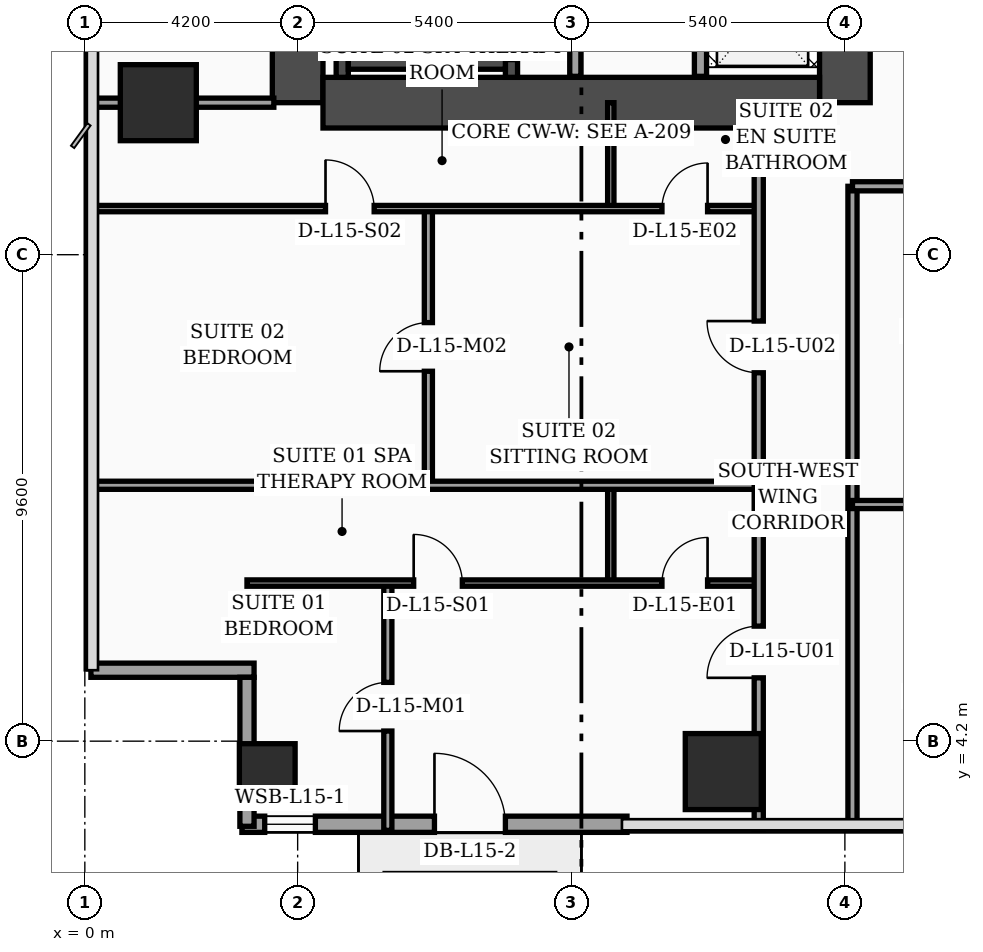
"""IFC4 building model, lengths in metres.
Left out: names, types, materials, properties, quantities, classifications, styles, units other than length and angle.
Written with IfcOpenShell. Run it as: python <this file> out.ifc"""

import sys

from ifc_helpers import new_model, si_unit, direction, frame, frame_2d, origin, origin_2d, place, context, subcontext, project, spatial, rectangle, hollow_rectangle, extrude, element, fill, save


model = new_model("IFC4")
c1 = context("Model", 3, precision=1e-05, world=origin(), true_north=direction((0.0, 1.0)))
c2 = subcontext(c1, "Body", "Model", "MODEL_VIEW")
j1 = project(units=[si_unit("LENGTHUNIT", "METRE"), si_unit("PLANEANGLEUNIT", "RADIAN")], contexts=[c1])
p1 = place(None, origin())
s1 = spatial("IfcSite", under=j1, at=p1, CompositionType="ELEMENT")
p2 = place(p1, origin())
s2 = spatial("IfcBuilding", under=s1, at=p2, CompositionType="ELEMENT")
p3 = place(p2, frame((0.0, 0.0, 66.0)))
s3 = spatial("IfcBuildingStorey", under=s2, at=p3, CompositionType="ELEMENT", Elevation=66.0)
p4 = place(p3, frame((4.2, 16.8, 0.0), z_axis=(0.0, 0.0, 1.0), x_axis=(0.0, 1.0, 0.0)))
e1 = element("IfcWall", 1, at=p4, inside=s3, PredefinedType="SHEAR", context=c2, shape_type="SweptSolid", body=[
    extrude(rectangle(XDim=21.6, YDim=1.0, at=frame_2d((10.8, 0.0))), origin(), (0.0, 0.0, 1.0), 3.56),
])
p5 = place(p3, frame((15.0, 16.8, 0.0), z_axis=(0.0, 0.0, 1.0), x_axis=(0.0, 1.0, 0.0)))
e2 = element("IfcWall", 2, at=p5, inside=s3, PredefinedType="SHEAR", context=c2, shape_type="SweptSolid", body=[
    extrude(rectangle(XDim=21.6, YDim=1.0, at=frame_2d((10.8, 0.0))), origin(), (0.0, 0.0, 1.0), 3.56),
])
p6 = place(p5, frame((8.65, 0.0, 0.0)))
e3 = element("IfcOpeningElement", 3, at=p6, cuts=e2, PredefinedType="OPENING", context=c2, shape_type="SweptSolid", body=[
    extrude(rectangle(XDim=1.1, YDim=2.2, at=frame_2d((0.55, 1.1))), frame((0.0, 0.51, 0.0), z_axis=(0.0, -1.0, 0.0), x_axis=(1.0, 0.0, 0.0)), (0.0, 0.0, 1.0), 1.02),
])
p7 = place(p5, frame((1.25, 0.0, 0.0)))
e4 = element("IfcOpeningElement", 4, at=p7, cuts=e2, PredefinedType="OPENING", context=c2, shape_type="SweptSolid", body=[
    extrude(rectangle(XDim=1.1, YDim=2.2, at=frame_2d((0.55, 1.1))), frame((0.0, 0.51, 0.0), z_axis=(0.0, -1.0, 0.0), x_axis=(1.0, 0.0, 0.0)), (0.0, 0.0, 1.0), 1.02),
])
p8 = place(p5, frame((3.8, 0.0, 0.0)))
e5 = element("IfcOpeningElement", 5, at=p8, cuts=e2, PredefinedType="OPENING", context=c2, shape_type="SweptSolid", body=[
    extrude(rectangle(XDim=1.1, YDim=2.2, at=frame_2d((0.55, 1.1))), frame((0.0, 0.51, 0.0), z_axis=(0.0, -1.0, 0.0), x_axis=(1.0, 0.0, 0.0)), (0.0, 0.0, 1.0), 1.02),
])
p9 = place(p5, frame((6.35, 0.0, 0.0)))
e6 = element("IfcOpeningElement", 6, at=p9, cuts=e2, PredefinedType="OPENING", context=c2, shape_type="SweptSolid", body=[
    extrude(rectangle(XDim=1.1, YDim=2.2, at=frame_2d((0.55, 1.1))), frame((0.0, 0.51, 0.0), z_axis=(0.0, -1.0, 0.0), x_axis=(1.0, 0.0, 0.0)), (0.0, 0.0, 1.0), 1.02),
])
p10 = place(p3, frame((4.7, 16.8, 0.0), z_axis=(0.0, 0.0, 1.0), x_axis=(1.0, 0.0, 0.0)))
e7 = element("IfcWall", 7, at=p10, inside=s3, PredefinedType="SHEAR", context=c2, shape_type="SweptSolid", body=[
    extrude(rectangle(XDim=9.8, YDim=1.0, at=frame_2d((4.9, 0.0))), origin(), (0.0, 0.0, 1.0), 3.56),
])
p11 = place(p3, frame((5.08, 17.3, 0.0), z_axis=(0.0, 0.0, 1.0), x_axis=(0.0, 1.0, 0.0)))
e8 = element("IfcWall", 8, at=p11, inside=s3, PredefinedType="SOLIDWALL", context=c2, shape_type="SweptSolid", body=[
    extrude(rectangle(XDim=9.49, YDim=0.24, at=frame_2d((4.745, 0.0))), origin(), (0.0, 0.0, 1.0), 3.56),
])
p12 = place(p3, frame((8.42, 17.3, 0.0), z_axis=(0.0, 0.0, 1.0), x_axis=(0.0, 1.0, 0.0)))
e9 = element("IfcWall", 9, at=p12, inside=s3, PredefinedType="SOLIDWALL", context=c2, shape_type="SweptSolid", body=[
    extrude(rectangle(XDim=9.49, YDim=0.24, at=frame_2d((4.745, 0.0))), origin(), (0.0, 0.0, 1.0), 3.56),
])
p13 = place(p12, frame((0.35, 0.0, 0.0)))
e10 = element("IfcOpeningElement", 10, at=p13, cuts=e9, PredefinedType="OPENING", context=c2, shape_type="SweptSolid", body=[
    extrude(rectangle(XDim=1.15, YDim=2.2, at=frame_2d((0.575, 1.1))), frame((0.0, 0.13, 0.0), z_axis=(0.0, -1.0, 0.0), x_axis=(1.0, 0.0, 0.0)), (0.0, 0.0, 1.0), 0.26),
])
p14 = place(p3, frame((5.2, 17.58, 0.0), z_axis=(0.0, 0.0, 1.0), x_axis=(1.0, 0.0, 0.0)))
e11 = element("IfcWall", 11, at=p14, inside=s3, PredefinedType="SOLIDWALL", context=c2, shape_type="SweptSolid", body=[
    extrude(rectangle(XDim=3.1, YDim=0.24, at=frame_2d((1.55, 0.0))), origin(), (0.0, 0.0, 1.0), 3.56),
])
p15 = place(p3, frame((3.6, 3.6, 0.0), z_axis=(0.0, 0.0, 1.0), x_axis=(1.0, 0.0, 0.0)))
e12 = element("IfcColumn", 12, at=p15, inside=s3, PredefinedType="COLUMN", context=c2, shape_type="SweptSolid", body=[
    extrude(hollow_rectangle(XDim=1.1, YDim=1.1, WallThickness=0.045, at=origin_2d()), origin(), (0.0, 0.0, 1.0), 3.56),
])
for number, where, z_axis, x_axis in (
    (13, (1.45, 16.8, 0.0), (0.0, 0.0, 1.0), (1.0, 0.0, 0.0)),
    (14, (12.6, 3.6, 0.0), (0.0, 0.0, 1.0), (1.0, 0.0, 0.0)),
):
    element("IfcColumn", number, at=place(p3, frame(where, z_axis=z_axis, x_axis=x_axis)), inside=s3, PredefinedType="COLUMN", context=c2, shape_type="SweptSolid", body=[
        extrude(rectangle(XDim=1.5, YDim=1.5, at=origin_2d()), origin(), (0.0, 0.0, 1.0), 3.56),
    ])
p16 = place(p3, frame((3.1, 2.56, 0.0), z_axis=(0.0, 0.0, 1.0), x_axis=(1.0, 0.0, 0.0)))
e15 = element("IfcWall", 15, at=p16, inside=s3, PredefinedType="SOLIDWALL", context=c2, shape_type="SweptSolid", body=[
    extrude(rectangle(XDim=7.6, YDim=0.32, at=frame_2d((3.8, 0.0))), origin(), (0.0, 0.0, 1.0), 3.56),
])
p17 = place(p16, frame((0.45, 0.0, 0.75)))
e16 = element("IfcOpeningElement", 16, at=p17, cuts=e15, PredefinedType="OPENING", context=c2, shape_type="SweptSolid", body=[
    extrude(rectangle(XDim=1.0, YDim=1.6, at=frame_2d((0.5, 0.8))), frame((0.0, 0.17, 0.0), z_axis=(0.0, -1.0, 0.0), x_axis=(1.0, 0.0, 0.0)), (0.0, 0.0, 1.0), 0.34),
])
p18 = place(p16, frame((3.8, 0.0, 0.0)))
e17 = element("IfcOpeningElement", 17, at=p18, cuts=e15, PredefinedType="OPENING", context=c2, shape_type="SweptSolid", body=[
    extrude(rectangle(XDim=1.4, YDim=2.25, at=frame_2d((0.7, 1.125))), frame((0.0, 0.17, 0.0), z_axis=(0.0, -1.0, 0.0), x_axis=(1.0, 0.0, 0.0)), (0.0, 0.0, 1.0), 0.34),
])
p19 = place(p3, frame((0.12, 5.6, 0.0), z_axis=(0.0, 0.0, 1.0), x_axis=(1.0, 0.0, 0.0)))
e18 = element("IfcWall", 18, at=p19, inside=s3, PredefinedType="SOLIDWALL", context=c2, shape_type="SweptSolid", body=[
    extrude(rectangle(XDim=3.22, YDim=0.28, at=frame_2d((1.61, 0.0))), origin(), (0.0, 0.0, 1.0), 2.84),
])
p20 = place(p3, frame((3.2, 5.46, 0.0), z_axis=(0.0, 0.0, 1.0), x_axis=(0.0, -1.0, 0.0)))
e19 = element("IfcWall", 19, at=p20, inside=s3, PredefinedType="SOLIDWALL", context=c2, shape_type="SweptSolid", body=[
    extrude(rectangle(XDim=2.94, YDim=0.28, at=frame_2d((1.47, 0.0))), origin(), (0.0, 0.0, 1.0), 2.84),
])
p21 = place(p3, frame((9.68, 17.32, 0.0), z_axis=(0.0, 0.0, 1.0), x_axis=(0.0, 1.0, 0.0)))
e20 = element("IfcWall", 20, at=p21, inside=s3, PredefinedType="SOLIDWALL", context=c2, shape_type="SweptSolid", body=[
    extrude(rectangle(XDim=7.68, YDim=0.22, at=frame_2d((3.84, 0.0))), origin(), (0.0, 0.0, 1.0), 3.56),
])
p22 = place(p3, frame((12.15, 17.32, 0.0), z_axis=(0.0, 0.0, 1.0), x_axis=(0.0, 1.0, 0.0)))
e21 = element("IfcWall", 21, at=p22, inside=s3, PredefinedType="SOLIDWALL", context=c2, shape_type="SweptSolid", body=[
    extrude(rectangle(XDim=7.65, YDim=0.24, at=frame_2d((3.825, 0.0))), origin(), (0.0, 0.0, 1.0), 3.56),
])
p23 = place(p3, frame((0.08, 16.8, 0.0), z_axis=(0.0, 0.0, 1.0), x_axis=(1.0, 0.0, 0.0)))
e22 = element("IfcWall", 22, at=p23, inside=s3, PredefinedType="PARTITIONING", context=c2, shape_type="SweptSolid", body=[
    extrude(rectangle(XDim=3.65, YDim=0.18, at=frame_2d((1.825, 0.0))), origin(), (0.0, 0.0, 1.0), 2.84),
])
p24 = place(p3, frame((10.38, 7.32, 0.0), z_axis=(0.0, 0.0, 1.0), x_axis=(0.0, 1.0, 0.0)))
e23 = element("IfcWall", 23, at=p24, inside=s3, PredefinedType="PARTITIONING", context=c2, shape_type="SweptSolid", body=[
    extrude(rectangle(XDim=1.93, YDim=0.125, at=frame_2d((0.965, 0.0))), origin(), (0.0, 0.0, 1.0), 3.56),
])
p25 = place(p3, frame((5.98, 2.44, 0.0), z_axis=(0.0, 0.0, 1.0), x_axis=(0.0, 1.0, 0.0)))
e24 = element("IfcWall", 24, at=p25, inside=s3, PredefinedType="PARTITIONING", context=c2, shape_type="SweptSolid", body=[
    extrude(rectangle(XDim=4.88, YDim=0.16, at=frame_2d((2.44, 0.0))), origin(), (0.0, 0.0, 1.0), 3.04),
])
p26 = place(p25, frame((1.96, 0.0, 0.0)))
e25 = element("IfcOpeningElement", 25, at=p26, cuts=e24, PredefinedType="OPENING", context=c2, shape_type="SweptSolid", body=[
    extrude(rectangle(XDim=0.96, YDim=2.2, at=frame_2d((0.48, 1.1))), frame((0.0, 0.09, 0.0), z_axis=(0.0, -1.0, 0.0), x_axis=(1.0, 0.0, 0.0)), (0.0, 0.0, 1.0), 0.18),
])
p27 = place(p3, frame((3.2, 7.32, 0.0), z_axis=(0.0, 0.0, 1.0), x_axis=(1.0, 0.0, 0.0)))
e26 = element("IfcWall", 26, at=p27, inside=s3, PredefinedType="PARTITIONING", context=c2, shape_type="SweptSolid", body=[
    extrude(rectangle(XDim=10.1, YDim=0.125, at=frame_2d((5.05, 0.0))), origin(), (0.0, 0.0, 1.0), 2.84),
])
p28 = place(p27, frame((3.29, 0.0, 0.0)))
e27 = element("IfcOpeningElement", 27, at=p28, cuts=e26, PredefinedType="OPENING", context=c2, shape_type="SweptSolid", body=[
    extrude(rectangle(XDim=0.96, YDim=2.2, at=frame_2d((0.48, 1.1))), frame((0.0, 0.073, 0.0), z_axis=(0.0, -1.0, 0.0), x_axis=(1.0, 0.0, 0.0)), (0.0, 0.0, 1.0), 0.145),
])
p29 = place(p27, frame((8.19, 0.0, 0.0)))
e28 = element("IfcOpeningElement", 28, at=p29, cuts=e26, PredefinedType="OPENING", context=c2, shape_type="SweptSolid", body=[
    extrude(rectangle(XDim=0.9, YDim=2.15, at=frame_2d((0.45, 1.075))), frame((0.0, 0.073, 0.0), z_axis=(0.0, -1.0, 0.0), x_axis=(1.0, 0.0, 0.0)), (0.0, 0.0, 1.0), 0.145),
])
p30 = place(p3, frame((10.38, 14.71, 0.0), z_axis=(0.0, 0.0, 1.0), x_axis=(0.0, 1.0, 0.0)))
e29 = element("IfcWall", 29, at=p30, inside=s3, PredefinedType="PARTITIONING", context=c2, shape_type="SweptSolid", body=[
    extrude(rectangle(XDim=2.09, YDim=0.125, at=frame_2d((1.045, 0.0))), origin(), (0.0, 0.0, 1.0), 3.56),
])
p31 = place(p3, frame((6.78, 9.25, 0.0), z_axis=(0.0, 0.0, 1.0), x_axis=(0.0, 1.0, 0.0)))
e30 = element("IfcWall", 30, at=p31, inside=s3, PredefinedType="PARTITIONING", context=c2, shape_type="SweptSolid", body=[
    extrude(rectangle(XDim=5.46, YDim=0.16, at=frame_2d((2.73, 0.0))), origin(), (0.0, 0.0, 1.0), 3.14),
])
p32 = place(p31, frame((2.25, 0.0, 0.0)))
e31 = element("IfcOpeningElement", 31, at=p32, cuts=e30, PredefinedType="OPENING", context=c2, shape_type="SweptSolid", body=[
    extrude(rectangle(XDim=0.96, YDim=2.2, at=frame_2d((0.48, 1.1))), frame((0.0, 0.09, 0.0), z_axis=(0.0, -1.0, 0.0), x_axis=(1.0, 0.0, 0.0)), (0.0, 0.0, 1.0), 0.18),
])
p33 = place(p3, frame((0.08, 14.71, 0.0), z_axis=(0.0, 0.0, 1.0), x_axis=(1.0, 0.0, 0.0)))
e32 = element("IfcWall", 32, at=p33, inside=s3, PredefinedType="PARTITIONING", context=c2, shape_type="SweptSolid", body=[
    extrude(rectangle(XDim=13.22, YDim=0.125, at=frame_2d((6.61, 0.0))), origin(), (0.0, 0.0, 1.0), 2.84),
])
p34 = place(p33, frame((4.67, 0.0, 0.0)))
e33 = element("IfcOpeningElement", 33, at=p34, cuts=e32, PredefinedType="OPENING", context=c2, shape_type="SweptSolid", body=[
    extrude(rectangle(XDim=0.96, YDim=2.2, at=frame_2d((0.48, 1.1))), frame((0.0, 0.073, 0.0), z_axis=(0.0, -1.0, 0.0), x_axis=(1.0, 0.0, 0.0)), (0.0, 0.0, 1.0), 0.145),
])
p35 = place(p33, frame((11.31, 0.0, 0.0)))
e34 = element("IfcOpeningElement", 34, at=p35, cuts=e32, PredefinedType="OPENING", context=c2, shape_type="SweptSolid", body=[
    extrude(rectangle(XDim=0.9, YDim=2.15, at=frame_2d((0.45, 1.075))), frame((0.0, 0.073, 0.0), z_axis=(0.0, -1.0, 0.0), x_axis=(1.0, 0.0, 0.0)), (0.0, 0.0, 1.0), 0.145),
])
p36 = place(p3, frame((0.08, 9.25, 0.0), z_axis=(0.0, 0.0, 1.0), x_axis=(1.0, 0.0, 0.0)))
e35 = element("IfcWall", 35, at=p36, inside=s3, PredefinedType="PARTITIONING", context=c2, shape_type="SweptSolid", body=[
    extrude(rectangle(XDim=13.22, YDim=0.16, at=frame_2d((6.61, 0.0))), origin(), (0.0, 0.0, 1.0), 2.84),
])
p37 = place(p3, frame((13.3, 2.44, 0.0), z_axis=(0.0, 0.0, 1.0), x_axis=(0.0, 1.0, 0.0)))
e36 = element("IfcWall", 36, at=p37, inside=s3, PredefinedType="PARTITIONING", context=c2, shape_type="SweptSolid", body=[
    extrude(rectangle(XDim=14.36, YDim=0.18, at=frame_2d((7.18, 0.0))), origin(), (0.0, 0.0, 1.0), 3.04),
])
p38 = place(p37, frame((3.01, 0.0, 0.0)))
e37 = element("IfcOpeningElement", 37, at=p38, cuts=e36, PredefinedType="OPENING", context=c2, shape_type="SweptSolid", body=[
    extrude(rectangle(XDim=1.02, YDim=2.2, at=frame_2d((0.51, 1.1))), frame((0.0, 0.1, 0.0), z_axis=(0.0, -1.0, 0.0), x_axis=(1.0, 0.0, 0.0)), (0.0, 0.0, 1.0), 0.2),
])
p39 = place(p37, frame((9.03, 0.0, 0.0)))
e38 = element("IfcOpeningElement", 38, at=p39, cuts=e36, PredefinedType="OPENING", context=c2, shape_type="SweptSolid", body=[
    extrude(rectangle(XDim=1.02, YDim=2.2, at=frame_2d((0.51, 1.1))), frame((0.0, 0.1, 0.0), z_axis=(0.0, -1.0, 0.0), x_axis=(1.0, 0.0, 0.0)), (0.0, 0.0, 1.0), 0.2),
])
p40 = place(p3, frame((15.15, 2.44, 0.0), z_axis=(0.0, 0.0, 1.0), x_axis=(0.0, 1.0, 0.0)))
e39 = element("IfcWall", 39, at=p40, inside=s3, PredefinedType="PARTITIONING", context=c2, shape_type="SweptSolid", body=[
    extrude(rectangle(XDim=12.71, YDim=0.18, at=frame_2d((6.355, 0.0))), origin(), (0.0, 0.0, 1.0), 3.04),
])
p41 = place(p3, frame((15.15, 8.87, 0.0), z_axis=(0.0, 0.0, 1.0), x_axis=(1.0, 0.0, 0.0)))
e40 = element("IfcWall", 40, at=p41, inside=s3, PredefinedType="PARTITIONING", context=c2, shape_type="SweptSolid", body=[
    extrude(rectangle(XDim=4.45, YDim=0.16, at=frame_2d((2.225, 0.0))), origin(), (0.0, 0.0, 1.0), 3.56),
])
p42 = place(p41, frame((1.75, 0.0, 0.0)))
e41 = element("IfcOpeningElement", 41, at=p42, cuts=e40, PredefinedType="OPENING", context=c2, shape_type="SweptSolid", body=[
    extrude(rectangle(XDim=0.96, YDim=2.2, at=frame_2d((0.48, 1.1))), frame((0.0, 0.09, 0.0), z_axis=(0.0, -1.0, 0.0), x_axis=(1.0, 0.0, 0.0)), (0.0, 0.0, 1.0), 0.18),
])
p43 = place(p3, frame((15.15, 15.15, 0.0), z_axis=(0.0, 0.0, 1.0), x_axis=(1.0, 0.0, 0.0)))
e42 = element("IfcWall", 42, at=p43, inside=s3, PredefinedType="PARTITIONING", context=c2, shape_type="SweptSolid", body=[
    extrude(rectangle(XDim=6.45, YDim=0.18, at=frame_2d((3.225, 0.0))), origin(), (0.0, 0.0, 1.0), 2.34),
])
p44 = place(p43, frame((1.74, 0.0, 0.0)))
e43 = element("IfcOpeningElement", 43, at=p44, cuts=e42, PredefinedType="OPENING", context=c2, shape_type="SweptSolid", body=[
    extrude(rectangle(XDim=1.02, YDim=2.2, at=frame_2d((0.51, 1.1))), frame((0.0, 0.1, 0.0), z_axis=(0.0, -1.0, 0.0), x_axis=(1.0, 0.0, 0.0)), (0.0, 0.0, 1.0), 0.2),
])
p45 = place(p17, origin())
e44 = element("IfcWindow", 44, at=p45, inside=s3, PartitioningType="SINGLE_PANEL", PredefinedType="WINDOW", context=c2, shape_type="SweptSolid", body=[
    extrude(rectangle(XDim=1.0, YDim=1.6, at=frame_2d((0.5, 0.8))), frame((0.0, 0.03, 0.0), z_axis=(0.0, -1.0, 0.0), x_axis=(1.0, 0.0, 0.0)), (0.0, 0.0, 1.0), 0.06),
])
fill(e16, e44)
p46 = place(p18, origin())
e45 = element("IfcDoor", 45, at=p46, inside=s3, OperationType="SINGLE_SWING_LEFT", PredefinedType="DOOR", context=c2, shape_type="SweptSolid", body=[
    extrude(rectangle(XDim=1.4, YDim=2.25, at=frame_2d((0.7, 1.125))), frame((0.0, 0.025, 0.0), z_axis=(0.0, -1.0, 0.0), x_axis=(1.0, 0.0, 0.0)), (0.0, 0.0, 1.0), 0.05),
])
fill(e17, e45)
p47 = place(p26, origin())
e46 = element("IfcDoor", 46, at=p47, inside=s3, OperationType="SINGLE_SWING_LEFT", PredefinedType="DOOR", context=c2, shape_type="SweptSolid", body=[
    extrude(rectangle(XDim=0.96, YDim=2.2, at=frame_2d((0.48, 1.1))), frame((0.0, 0.025, 0.0), z_axis=(0.0, -1.0, 0.0), x_axis=(1.0, 0.0, 0.0)), (0.0, 0.0, 1.0), 0.05),
])
fill(e25, e46)
p48 = place(p28, origin())
e47 = element("IfcDoor", 47, at=p48, inside=s3, OperationType="SINGLE_SWING_LEFT", PredefinedType="DOOR", context=c2, shape_type="SweptSolid", body=[
    extrude(rectangle(XDim=0.96, YDim=2.2, at=frame_2d((0.48, 1.1))), frame((0.0, 0.025, 0.0), z_axis=(0.0, -1.0, 0.0), x_axis=(1.0, 0.0, 0.0)), (0.0, 0.0, 1.0), 0.05),
])
fill(e27, e47)
p49 = place(p29, origin())
e48 = element("IfcDoor", 48, at=p49, inside=s3, OperationType="SINGLE_SWING_RIGHT", PredefinedType="DOOR", context=c2, shape_type="SweptSolid", body=[
    extrude(rectangle(XDim=0.9, YDim=2.15, at=frame_2d((0.45, 1.075))), frame((0.0, 0.025, 0.0), z_axis=(0.0, -1.0, 0.0), x_axis=(1.0, 0.0, 0.0)), (0.0, 0.0, 1.0), 0.05),
])
fill(e28, e48)
p50 = place(p32, origin())
e49 = element("IfcDoor", 49, at=p50, inside=s3, OperationType="SINGLE_SWING_LEFT", PredefinedType="DOOR", context=c2, shape_type="SweptSolid", body=[
    extrude(rectangle(XDim=0.96, YDim=2.2, at=frame_2d((0.48, 1.1))), frame((0.0, 0.025, 0.0), z_axis=(0.0, -1.0, 0.0), x_axis=(1.0, 0.0, 0.0)), (0.0, 0.0, 1.0), 0.05),
])
fill(e31, e49)
p51 = place(p34, origin())
e50 = element("IfcDoor", 50, at=p51, inside=s3, OperationType="SINGLE_SWING_LEFT", PredefinedType="DOOR", context=c2, shape_type="SweptSolid", body=[
    extrude(rectangle(XDim=0.96, YDim=2.2, at=frame_2d((0.48, 1.1))), frame((0.0, 0.025, 0.0), z_axis=(0.0, -1.0, 0.0), x_axis=(1.0, 0.0, 0.0)), (0.0, 0.0, 1.0), 0.05),
])
fill(e33, e50)
p52 = place(p35, origin())
e51 = element("IfcDoor", 51, at=p52, inside=s3, OperationType="SINGLE_SWING_RIGHT", PredefinedType="DOOR", context=c2, shape_type="SweptSolid", body=[
    extrude(rectangle(XDim=0.9, YDim=2.15, at=frame_2d((0.45, 1.075))), frame((0.0, 0.025, 0.0), z_axis=(0.0, -1.0, 0.0), x_axis=(1.0, 0.0, 0.0)), (0.0, 0.0, 1.0), 0.05),
])
fill(e34, e51)
p53 = place(p38, origin())
e52 = element("IfcDoor", 52, at=p53, inside=s3, OperationType="SINGLE_SWING_LEFT", PredefinedType="DOOR", context=c2, shape_type="SweptSolid", body=[
    extrude(rectangle(XDim=1.02, YDim=2.2, at=frame_2d((0.51, 1.1))), frame((0.0, 0.025, 0.0), z_axis=(0.0, -1.0, 0.0), x_axis=(1.0, 0.0, 0.0)), (0.0, 0.0, 1.0), 0.05),
])
fill(e37, e52)
p54 = place(p39, origin())
e53 = element("IfcDoor", 53, at=p54, inside=s3, OperationType="SINGLE_SWING_RIGHT", PredefinedType="DOOR", context=c2, shape_type="SweptSolid", body=[
    extrude(rectangle(XDim=1.02, YDim=2.2, at=frame_2d((0.51, 1.1))), frame((0.0, 0.025, 0.0), z_axis=(0.0, -1.0, 0.0), x_axis=(1.0, 0.0, 0.0)), (0.0, 0.0, 1.0), 0.05),
])
fill(e38, e53)
p55 = place(p13, origin())
e54 = element("IfcDoor", 54, at=p55, inside=s3, OperationType="SINGLE_SWING_LEFT", PredefinedType="DOOR", context=c2, shape_type="SweptSolid", body=[
    extrude(rectangle(XDim=1.15, YDim=2.2, at=frame_2d((0.575, 1.1))), frame((0.0, 0.025, 0.0), z_axis=(0.0, -1.0, 0.0), x_axis=(1.0, 0.0, 0.0)), (0.0, 0.0, 1.0), 0.05),
])
fill(e10, e54)
save(model, sys.argv[1])
